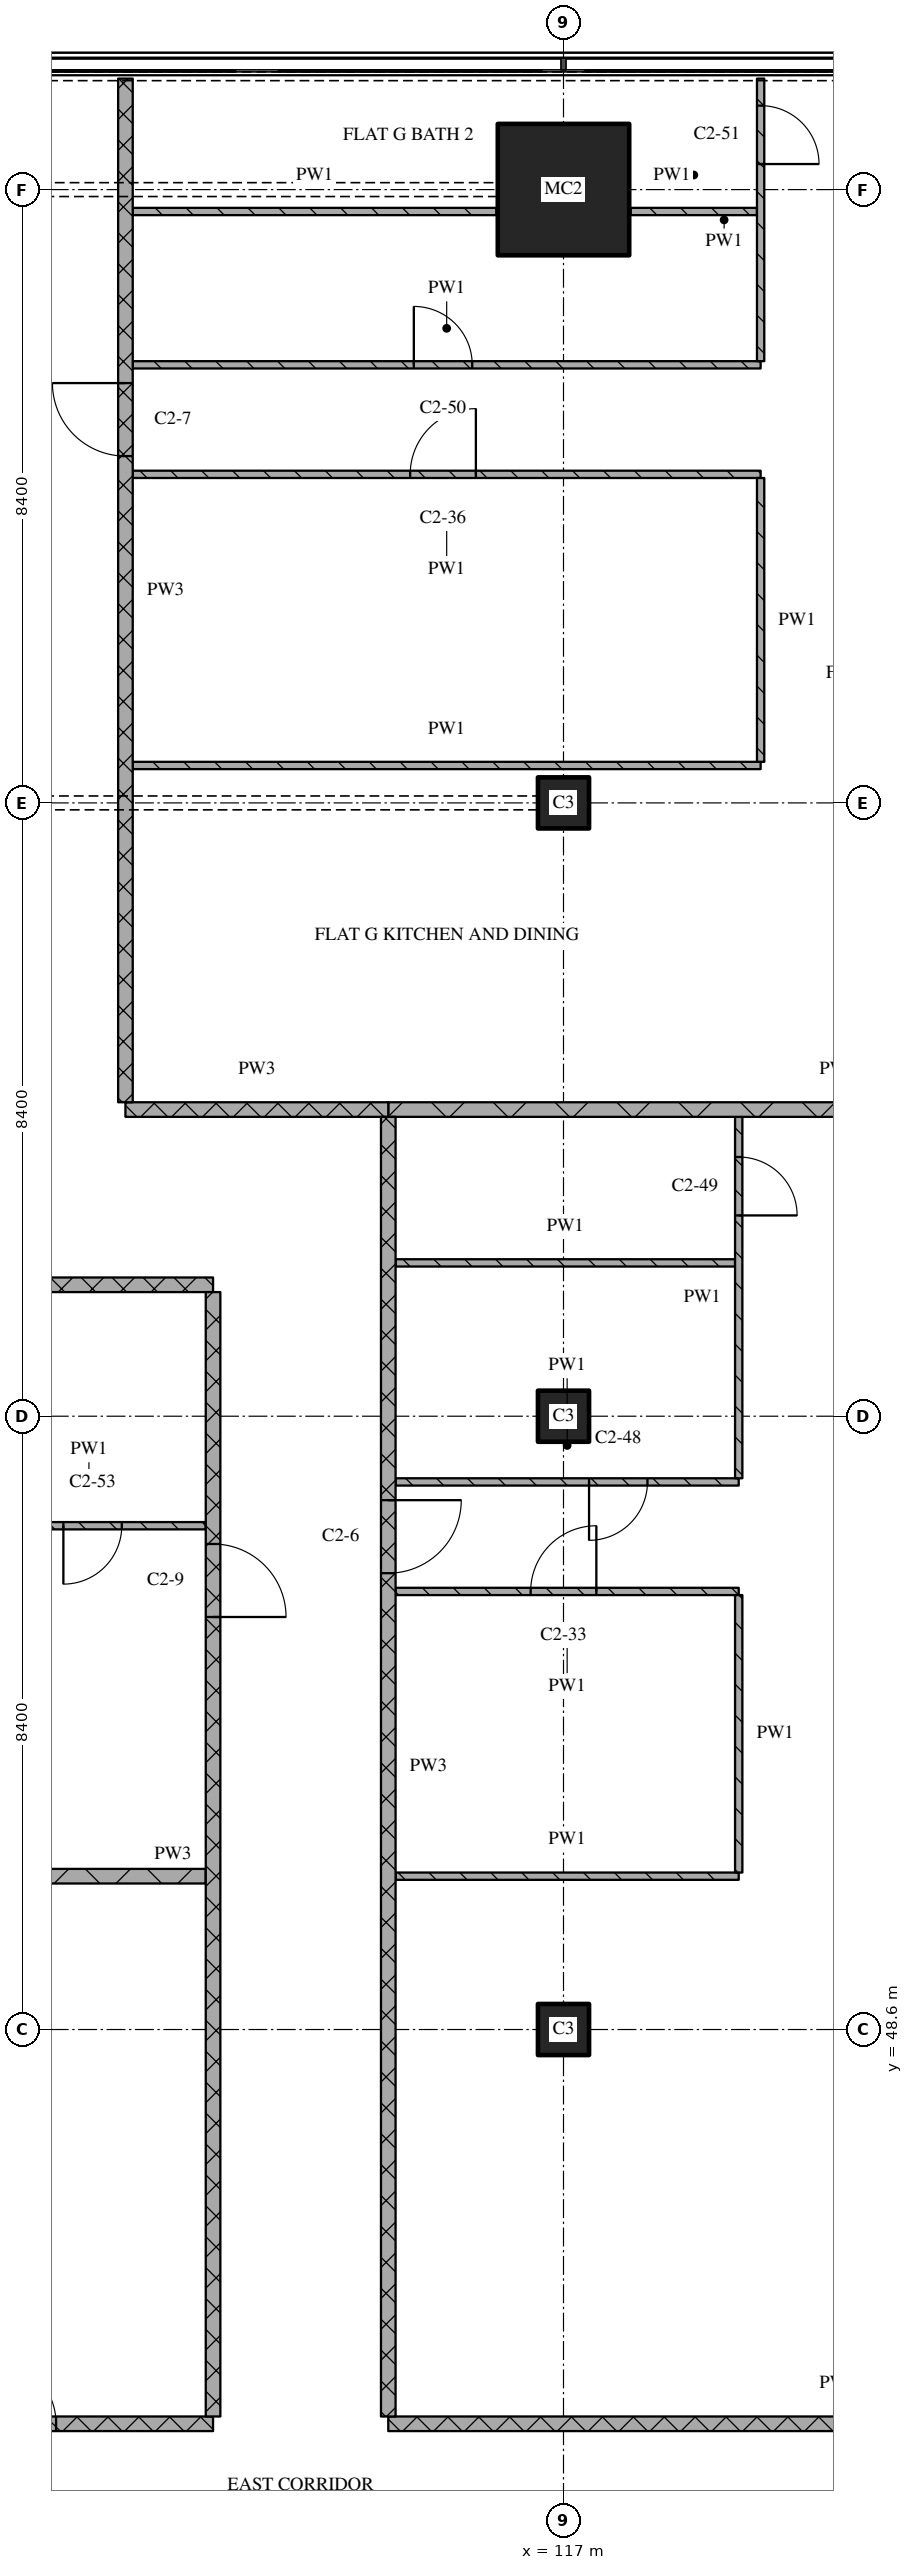
"""IFC4 building model, lengths in metres.
Left out: names, types, materials, properties, quantities, classifications, styles, units other than length and angle.
Written with IfcOpenShell. Run it as: python <this file> out.ifc"""

import sys

from ifc_helpers import new_model, si_unit, direction, frame, frame_2d, origin, origin_2d, place, context, subcontext, project, spatial, rectangle, extrude, element, fill, save


model = new_model("IFC4")
c1 = context("Model", 3, precision=1e-05, world=origin(), true_north=direction((0.0, 1.0)))
c2 = subcontext(c1, "Body", "Model", "MODEL_VIEW")
j1 = project(units=[si_unit("LENGTHUNIT", "METRE"), si_unit("PLANEANGLEUNIT", "RADIAN")], contexts=[c1])
p1 = place(None, origin())
s1 = spatial("IfcSite", under=j1, at=p1, CompositionType="ELEMENT")
p2 = place(p1, origin())
s2 = spatial("IfcBuilding", under=s1, at=p2, CompositionType="ELEMENT")
p3 = place(p2, frame((0.0, 0.0, 161.85)))
s3 = spatial("IfcBuildingStorey", under=s2, at=p3, CompositionType="ELEMENT", Elevation=161.85)
for number, where, z_axis, x_axis in (
    (1, (117.0, 48.6, 0.0), (0.0, 0.0, 1.0), (1.0, 0.0, 0.0)),
    (2, (117.0, 57.0, 0.0), (0.0, 0.0, 1.0), (1.0, 0.0, 0.0)),
    (3, (117.0, 65.4, 0.0), (0.0, 0.0, 1.0), (1.0, 0.0, 0.0)),
):
    element("IfcColumn", number, at=place(p3, frame(where, z_axis=z_axis, x_axis=x_axis)), inside=s3, PredefinedType="COLUMN", context=c2, shape_type="SweptSolid", body=[
        extrude(rectangle(XDim=0.7, YDim=0.7, at=origin_2d()), origin(), (0.0, 0.0, 1.0), 3.6),
    ])
p4 = place(p3, frame((117.0, 73.8, 0.0), z_axis=(0.0, 0.0, 1.0), x_axis=(1.0, 0.0, 0.0)))
e4 = element("IfcColumn", 4, at=p4, inside=s3, PredefinedType="COLUMN", context=c2, shape_type="SweptSolid", body=[
    extrude(rectangle(XDim=1.8, YDim=1.8, at=origin_2d()), origin(), (0.0, 0.0, 1.0), 3.6),
])
p5 = place(p3, frame((107.0, 43.2, 0.0), z_axis=(0.0, 0.0, 1.0), x_axis=(1.0, 0.0, 0.0)))
e5 = element("IfcWall", 5, at=p5, inside=s3, PredefinedType="PARTITIONING", context=c2, shape_type="SweptSolid", body=[
    extrude(rectangle(XDim=5.2, YDim=0.2, at=frame_2d((2.6, 0.0))), origin(), (0.0, 0.0, 1.0), 3.32),
])
p6 = place(p5, frame((2.15, 0.0, 0.0)))
e6 = element("IfcOpeningElement", 6, at=p6, cuts=e5, PredefinedType="OPENING", context=c2, shape_type="SweptSolid", body=[
    extrude(rectangle(XDim=0.9, YDim=2.1, at=frame_2d((0.45, 1.05))), frame((0.0, 0.11, 0.0), z_axis=(0.0, -1.0, 0.0), x_axis=(1.0, 0.0, 0.0)), (0.0, 0.0, 1.0), 0.22),
])
p7 = place(p3, frame((114.6, 43.2, 0.0), z_axis=(0.0, 0.0, 1.0), x_axis=(1.0, 0.0, 0.0)))
e7 = element("IfcWall", 7, at=p7, inside=s3, PredefinedType="PARTITIONING", context=c2, shape_type="SweptSolid", body=[
    extrude(rectangle(XDim=12.32, YDim=0.2, at=frame_2d((6.16, 0.0))), origin(), (0.0, 0.0, 1.0), 3.32),
])
p8 = place(p3, frame((107.0, 50.7, 0.0), z_axis=(0.0, 0.0, 1.0), x_axis=(1.0, 0.0, 0.0)))
e8 = element("IfcWall", 8, at=p8, inside=s3, PredefinedType="PARTITIONING", context=c2, shape_type="SweptSolid", body=[
    extrude(rectangle(XDim=5.1, YDim=0.2, at=frame_2d((2.55, 0.0))), origin(), (0.0, 0.0, 1.0), 3.32),
])
p9 = place(p3, frame((114.7, 50.7, 0.0), z_axis=(0.0, 0.0, 1.0), x_axis=(1.0, 0.0, 0.0)))
e9 = element("IfcWall", 9, at=p9, inside=s3, PredefinedType="PARTITIONING", context=c2, shape_type="SweptSolid", body=[
    extrude(rectangle(XDim=4.7, YDim=0.1, at=frame_2d((2.35, 0.0))), origin(), (0.0, 0.0, 1.0), 3.32),
])
p10 = place(p3, frame((119.4, 54.6, 0.0), z_axis=(0.0, 0.0, 1.0), x_axis=(-1.0, 0.0, 0.0)))
e10 = element("IfcWall", 10, at=p10, inside=s3, PredefinedType="PARTITIONING", context=c2, shape_type="SweptSolid", body=[
    extrude(rectangle(XDim=4.7, YDim=0.1, at=frame_2d((2.35, 0.0))), origin(), (0.0, 0.0, 1.0), 3.32),
])
p11 = place(p10, frame((1.95, 0.0, 0.0)))
e11 = element("IfcOpeningElement", 11, at=p11, cuts=e10, PredefinedType="OPENING", context=c2, shape_type="SweptSolid", body=[
    extrude(rectangle(XDim=0.9, YDim=2.1, at=frame_2d((0.45, 1.05))), frame((0.0, 0.06, 0.0), z_axis=(0.0, -1.0, 0.0), x_axis=(1.0, 0.0, 0.0)), (0.0, 0.0, 1.0), 0.12),
])
p12 = place(p3, frame((108.9, 55.5, 0.0), z_axis=(0.0, 0.0, 1.0), x_axis=(1.0, 0.0, 0.0)))
e12 = element("IfcWall", 12, at=p12, inside=s3, PredefinedType="PARTITIONING", context=c2, shape_type="SweptSolid", body=[
    extrude(rectangle(XDim=3.2, YDim=0.1, at=frame_2d((1.6, 0.0))), origin(), (0.0, 0.0, 1.0), 3.32),
])
p13 = place(p12, frame((1.25, 0.0, 0.0)))
e13 = element("IfcOpeningElement", 13, at=p13, cuts=e12, PredefinedType="OPENING", context=c2, shape_type="SweptSolid", body=[
    extrude(rectangle(XDim=0.8, YDim=2.1, at=frame_2d((0.4, 1.05))), frame((0.0, 0.06, 0.0), z_axis=(0.0, -1.0, 0.0), x_axis=(1.0, 0.0, 0.0)), (0.0, 0.0, 1.0), 0.12),
])
p14 = place(p3, frame((114.7, 56.1, 0.0), z_axis=(0.0, 0.0, 1.0), x_axis=(1.0, 0.0, 0.0)))
e14 = element("IfcWall", 14, at=p14, inside=s3, PredefinedType="PARTITIONING", context=c2, shape_type="SweptSolid", body=[
    extrude(rectangle(XDim=4.7, YDim=0.1, at=frame_2d((2.35, 0.0))), origin(), (0.0, 0.0, 1.0), 3.32),
])
p15 = place(p14, frame((2.65, 0.0, 0.0)))
e15 = element("IfcOpeningElement", 15, at=p15, cuts=e14, PredefinedType="OPENING", context=c2, shape_type="SweptSolid", body=[
    extrude(rectangle(XDim=0.8, YDim=2.1, at=frame_2d((0.4, 1.05))), frame((0.0, 0.06, 0.0), z_axis=(0.0, -1.0, 0.0), x_axis=(1.0, 0.0, 0.0)), (0.0, 0.0, 1.0), 0.12),
])
p16 = place(p3, frame((101.4, 58.8, 0.0), z_axis=(0.0, 0.0, 1.0), x_axis=(1.0, 0.0, 0.0)))
e16 = element("IfcWall", 16, at=p16, inside=s3, PredefinedType="PARTITIONING", context=c2, shape_type="SweptSolid", body=[
    extrude(rectangle(XDim=10.8, YDim=0.2, at=frame_2d((5.4, 0.0))), origin(), (0.0, 0.0, 1.0), 3.32),
])
p17 = place(p3, frame((114.7, 59.1, 0.0), z_axis=(0.0, 0.0, 1.0), x_axis=(1.0, 0.0, 0.0)))
e17 = element("IfcWall", 17, at=p17, inside=s3, PredefinedType="PARTITIONING", context=c2, shape_type="SweptSolid", body=[
    extrude(rectangle(XDim=4.65, YDim=0.1, at=frame_2d((2.325, 0.0))), origin(), (0.0, 0.0, 1.0), 3.32),
])
p18 = place(p3, frame((111.0, 61.2, 0.0), z_axis=(0.0, 0.0, 1.0), x_axis=(1.0, 0.0, 0.0)))
e18 = element("IfcWall", 18, at=p18, inside=s3, PredefinedType="PARTITIONING", context=c2, shape_type="SweptSolid", body=[
    extrude(rectangle(XDim=3.6, YDim=0.2, at=frame_2d((1.8, 0.0))), origin(), (0.0, 0.0, 1.0), 3.32),
])
p19 = place(p3, frame((114.6, 61.2, 0.0), z_axis=(0.0, 0.0, 1.0), x_axis=(1.0, 0.0, 0.0)))
e19 = element("IfcWall", 19, at=p19, inside=s3, PredefinedType="PARTITIONING", context=c2, shape_type="SweptSolid", body=[
    extrude(rectangle(XDim=12.32, YDim=0.2, at=frame_2d((6.16, 0.0))), origin(), (0.0, 0.0, 1.0), 3.32),
])
p20 = place(p3, frame((111.1, 65.913, 0.0), z_axis=(0.0, 0.0, 1.0), x_axis=(1.0, 0.0, 0.0)))
e20 = element("IfcWall", 20, at=p20, inside=s3, PredefinedType="PARTITIONING", context=c2, shape_type="SweptSolid", body=[
    extrude(rectangle(XDim=8.6, YDim=0.1, at=frame_2d((4.3, 0.0))), origin(), (0.0, 0.0, 1.0), 3.32),
])
p21 = place(p3, frame((119.7, 69.9, 0.0), z_axis=(0.0, 0.0, 1.0), x_axis=(-1.0, 0.0, 0.0)))
e21 = element("IfcWall", 21, at=p21, inside=s3, PredefinedType="PARTITIONING", context=c2, shape_type="SweptSolid", body=[
    extrude(rectangle(XDim=8.6, YDim=0.1, at=frame_2d((4.3, 0.0))), origin(), (0.0, 0.0, 1.0), 3.32),
])
p22 = place(p21, frame((3.9, 0.0, 0.0)))
e22 = element("IfcOpeningElement", 22, at=p22, cuts=e21, PredefinedType="OPENING", context=c2, shape_type="SweptSolid", body=[
    extrude(rectangle(XDim=0.9, YDim=2.1, at=frame_2d((0.45, 1.05))), frame((0.0, 0.06, 0.0), z_axis=(0.0, -1.0, 0.0), x_axis=(1.0, 0.0, 0.0)), (0.0, 0.0, 1.0), 0.12),
])
p23 = place(p3, frame((111.1, 71.4, 0.0), z_axis=(0.0, 0.0, 1.0), x_axis=(1.0, 0.0, 0.0)))
e23 = element("IfcWall", 23, at=p23, inside=s3, PredefinedType="PARTITIONING", context=c2, shape_type="SweptSolid", body=[
    extrude(rectangle(XDim=8.6, YDim=0.1, at=frame_2d((4.3, 0.0))), origin(), (0.0, 0.0, 1.0), 3.32),
])
p24 = place(p23, frame((3.85, 0.0, 0.0)))
e24 = element("IfcOpeningElement", 24, at=p24, cuts=e23, PredefinedType="OPENING", context=c2, shape_type="SweptSolid", body=[
    extrude(rectangle(XDim=0.8, YDim=2.1, at=frame_2d((0.4, 1.05))), frame((0.0, 0.06, 0.0), z_axis=(0.0, -1.0, 0.0), x_axis=(1.0, 0.0, 0.0)), (0.0, 0.0, 1.0), 0.12),
])
p25 = place(p3, frame((111.1, 73.5, 0.0), z_axis=(0.0, 0.0, 1.0), x_axis=(1.0, 0.0, 0.0)))
e25 = element("IfcWall", 25, at=p25, inside=s3, PredefinedType="PARTITIONING", context=c2, shape_type="SweptSolid", body=[
    extrude(rectangle(XDim=4.98, YDim=0.1, at=frame_2d((2.49, 0.0))), origin(), (0.0, 0.0, 1.0), 3.32),
])
p26 = place(p3, frame((117.92, 73.5, 0.0), z_axis=(0.0, 0.0, 1.0), x_axis=(1.0, 0.0, 0.0)))
e26 = element("IfcWall", 26, at=p26, inside=s3, PredefinedType="PARTITIONING", context=c2, shape_type="SweptSolid", body=[
    extrude(rectangle(XDim=1.73, YDim=0.1, at=frame_2d((0.865, 0.0))), origin(), (0.0, 0.0, 1.0), 3.32),
])
p27 = place(p3, frame((111.0, 75.32, 0.0), z_axis=(0.0, 0.0, 1.0), x_axis=(0.0, -1.0, 0.0)))
e27 = element("IfcWall", 27, at=p27, inside=s3, PredefinedType="PARTITIONING", context=c2, shape_type="SweptSolid", body=[
    extrude(rectangle(XDim=14.02, YDim=0.2, at=frame_2d((7.01, 0.0))), origin(), (0.0, 0.0, 1.0), 3.32),
])
p28 = place(p27, frame((4.17, 0.0, 0.0)))
e28 = element("IfcOpeningElement", 28, at=p28, cuts=e27, PredefinedType="OPENING", context=c2, shape_type="SweptSolid", body=[
    extrude(rectangle(XDim=1.0, YDim=2.1, at=frame_2d((0.5, 1.05))), frame((0.0, 0.11, 0.0), z_axis=(0.0, -1.0, 0.0), x_axis=(1.0, 0.0, 0.0)), (0.0, 0.0, 1.0), 0.22),
])
p29 = place(p3, frame((112.2, 43.3, 0.0), z_axis=(0.0, 0.0, 1.0), x_axis=(0.0, 1.0, 0.0)))
e29 = element("IfcWall", 29, at=p29, inside=s3, PredefinedType="PARTITIONING", context=c2, shape_type="SweptSolid", body=[
    extrude(rectangle(XDim=15.4, YDim=0.2, at=frame_2d((7.7, 0.0))), origin(), (0.0, 0.0, 1.0), 3.32),
])
p30 = place(p29, frame((10.95, 0.0, 0.0)))
e30 = element("IfcOpeningElement", 30, at=p30, cuts=e29, PredefinedType="OPENING", context=c2, shape_type="SweptSolid", body=[
    extrude(rectangle(XDim=1.0, YDim=2.1, at=frame_2d((0.5, 1.05))), frame((0.0, 0.11, 0.0), z_axis=(0.0, -1.0, 0.0), x_axis=(1.0, 0.0, 0.0)), (0.0, 0.0, 1.0), 0.22),
])
p31 = place(p3, frame((114.6, 61.1, 0.0), z_axis=(0.0, 0.0, 1.0), x_axis=(0.0, -1.0, 0.0)))
e31 = element("IfcWall", 31, at=p31, inside=s3, PredefinedType="PARTITIONING", context=c2, shape_type="SweptSolid", body=[
    extrude(rectangle(XDim=17.8, YDim=0.2, at=frame_2d((8.9, 0.0))), origin(), (0.0, 0.0, 1.0), 3.32),
])
p32 = place(p31, frame((5.25, 0.0, 0.0)))
e32 = element("IfcOpeningElement", 32, at=p32, cuts=e31, PredefinedType="OPENING", context=c2, shape_type="SweptSolid", body=[
    extrude(rectangle(XDim=1.0, YDim=2.1, at=frame_2d((0.5, 1.05))), frame((0.0, 0.11, 0.0), z_axis=(0.0, -1.0, 0.0), x_axis=(1.0, 0.0, 0.0)), (0.0, 0.0, 1.0), 0.22),
])
p33 = place(p3, frame((119.4, 54.55, 0.0), z_axis=(0.0, 0.0, 1.0), x_axis=(0.0, -1.0, 0.0)))
e33 = element("IfcWall", 33, at=p33, inside=s3, PredefinedType="PARTITIONING", context=c2, shape_type="SweptSolid", body=[
    extrude(rectangle(XDim=3.8, YDim=0.1, at=frame_2d((1.9, 0.0))), origin(), (0.0, 0.0, 1.0), 3.32),
])
p34 = place(p3, frame((119.4, 56.15, 0.0), z_axis=(0.0, 0.0, 1.0), x_axis=(0.0, 1.0, 0.0)))
e34 = element("IfcWall", 34, at=p34, inside=s3, PredefinedType="PARTITIONING", context=c2, shape_type="SweptSolid", body=[
    extrude(rectangle(XDim=4.95, YDim=0.1, at=frame_2d((2.475, 0.0))), origin(), (0.0, 0.0, 1.0), 3.32),
])
p35 = place(p34, frame((3.6, 0.0, 0.0)))
e35 = element("IfcOpeningElement", 35, at=p35, cuts=e34, PredefinedType="OPENING", context=c2, shape_type="SweptSolid", body=[
    extrude(rectangle(XDim=0.8, YDim=2.1, at=frame_2d((0.4, 1.05))), frame((0.0, 0.06, 0.0), z_axis=(0.0, -1.0, 0.0), x_axis=(1.0, 0.0, 0.0)), (0.0, 0.0, 1.0), 0.12),
])
p36 = place(p3, frame((119.7, 69.85, 0.0), z_axis=(0.0, 0.0, 1.0), x_axis=(0.0, -1.0, 0.0)))
e36 = element("IfcWall", 36, at=p36, inside=s3, PredefinedType="PARTITIONING", context=c2, shape_type="SweptSolid", body=[
    extrude(rectangle(XDim=3.887, YDim=0.1, at=frame_2d((1.944, 0.0))), origin(), (0.0, 0.0, 1.0), 3.32),
])
p37 = place(p3, frame((119.7, 71.45, 0.0), z_axis=(0.0, 0.0, 1.0), x_axis=(0.0, 1.0, 0.0)))
e37 = element("IfcWall", 37, at=p37, inside=s3, PredefinedType="PARTITIONING", context=c2, shape_type="SweptSolid", body=[
    extrude(rectangle(XDim=3.87, YDim=0.1, at=frame_2d((1.935, 0.0))), origin(), (0.0, 0.0, 1.0), 3.32),
])
p38 = place(p37, frame((2.7, 0.0, 0.0)))
e38 = element("IfcOpeningElement", 38, at=p38, cuts=e37, PredefinedType="OPENING", context=c2, shape_type="SweptSolid", body=[
    extrude(rectangle(XDim=0.8, YDim=2.1, at=frame_2d((0.4, 1.05))), frame((0.0, 0.06, 0.0), z_axis=(0.0, -1.0, 0.0), x_axis=(1.0, 0.0, 0.0)), (0.0, 0.0, 1.0), 0.12),
])
p39 = place(p6, origin())
e39 = element("IfcDoor", 39, at=p39, inside=s3, OperationType="SINGLE_SWING_LEFT", PredefinedType="DOOR", context=c2, shape_type="SweptSolid", body=[
    extrude(rectangle(XDim=0.9, YDim=2.1, at=frame_2d((0.45, 1.05))), frame((0.0, 0.025, 0.0), z_axis=(0.0, -1.0, 0.0), x_axis=(1.0, 0.0, 0.0)), (0.0, 0.0, 1.0), 0.05),
])
fill(e6, e39)
p40 = place(p11, origin())
e40 = element("IfcDoor", 40, at=p40, inside=s3, OperationType="SINGLE_SWING_RIGHT", PredefinedType="DOOR", context=c2, shape_type="SweptSolid", body=[
    extrude(rectangle(XDim=0.9, YDim=2.1, at=frame_2d((0.45, 1.05))), frame((0.0, 0.025, 0.0), z_axis=(0.0, -1.0, 0.0), x_axis=(1.0, 0.0, 0.0)), (0.0, 0.0, 1.0), 0.05),
])
fill(e11, e40)
p41 = place(p13, origin())
e41 = element("IfcDoor", 41, at=p41, inside=s3, OperationType="SINGLE_SWING_RIGHT", PredefinedType="DOOR", context=c2, shape_type="SweptSolid", body=[
    extrude(rectangle(XDim=0.8, YDim=2.1, at=frame_2d((0.4, 1.05))), frame((0.0, 0.025, 0.0), z_axis=(0.0, -1.0, 0.0), x_axis=(1.0, 0.0, 0.0)), (0.0, 0.0, 1.0), 0.05),
])
fill(e13, e41)
p42 = place(p15, origin())
e42 = element("IfcDoor", 42, at=p42, inside=s3, OperationType="SINGLE_SWING_RIGHT", PredefinedType="DOOR", context=c2, shape_type="SweptSolid", body=[
    extrude(rectangle(XDim=0.8, YDim=2.1, at=frame_2d((0.4, 1.05))), frame((0.0, 0.025, 0.0), z_axis=(0.0, -1.0, 0.0), x_axis=(1.0, 0.0, 0.0)), (0.0, 0.0, 1.0), 0.05),
])
fill(e15, e42)
p43 = place(p22, origin())
e43 = element("IfcDoor", 43, at=p43, inside=s3, OperationType="SINGLE_SWING_RIGHT", PredefinedType="DOOR", context=c2, shape_type="SweptSolid", body=[
    extrude(rectangle(XDim=0.9, YDim=2.1, at=frame_2d((0.45, 1.05))), frame((0.0, 0.025, 0.0), z_axis=(0.0, -1.0, 0.0), x_axis=(1.0, 0.0, 0.0)), (0.0, 0.0, 1.0), 0.05),
])
fill(e22, e43)
p44 = place(p24, origin())
e44 = element("IfcDoor", 44, at=p44, inside=s3, OperationType="SINGLE_SWING_LEFT", PredefinedType="DOOR", context=c2, shape_type="SweptSolid", body=[
    extrude(rectangle(XDim=0.8, YDim=2.1, at=frame_2d((0.4, 1.05))), frame((0.0, 0.025, 0.0), z_axis=(0.0, -1.0, 0.0), x_axis=(1.0, 0.0, 0.0)), (0.0, 0.0, 1.0), 0.05),
])
fill(e24, e44)
p45 = place(p28, origin())
e45 = element("IfcDoor", 45, at=p45, inside=s3, OperationType="SINGLE_SWING_RIGHT", PredefinedType="DOOR", context=c2, shape_type="SweptSolid", body=[
    extrude(rectangle(XDim=1.0, YDim=2.1, at=frame_2d((0.5, 1.05))), frame((0.0, 0.025, 0.0), z_axis=(0.0, -1.0, 0.0), x_axis=(1.0, 0.0, 0.0)), (0.0, 0.0, 1.0), 0.05),
])
fill(e28, e45)
p46 = place(p30, origin())
e46 = element("IfcDoor", 46, at=p46, inside=s3, OperationType="SINGLE_SWING_RIGHT", PredefinedType="DOOR", context=c2, shape_type="SweptSolid", body=[
    extrude(rectangle(XDim=1.0, YDim=2.1, at=frame_2d((0.5, 1.05))), frame((0.0, 0.025, 0.0), z_axis=(0.0, -1.0, 0.0), x_axis=(1.0, 0.0, 0.0)), (0.0, 0.0, 1.0), 0.05),
])
fill(e30, e46)
p47 = place(p32, origin())
e47 = element("IfcDoor", 47, at=p47, inside=s3, OperationType="SINGLE_SWING_LEFT", PredefinedType="DOOR", context=c2, shape_type="SweptSolid", body=[
    extrude(rectangle(XDim=1.0, YDim=2.1, at=frame_2d((0.5, 1.05))), frame((0.0, 0.025, 0.0), z_axis=(0.0, -1.0, 0.0), x_axis=(1.0, 0.0, 0.0)), (0.0, 0.0, 1.0), 0.05),
])
fill(e32, e47)
p48 = place(p35, origin())
e48 = element("IfcDoor", 48, at=p48, inside=s3, OperationType="SINGLE_SWING_RIGHT", PredefinedType="DOOR", context=c2, shape_type="SweptSolid", body=[
    extrude(rectangle(XDim=0.8, YDim=2.1, at=frame_2d((0.4, 1.05))), frame((0.0, 0.025, 0.0), z_axis=(0.0, -1.0, 0.0), x_axis=(1.0, 0.0, 0.0)), (0.0, 0.0, 1.0), 0.05),
])
fill(e35, e48)
p49 = place(p38, origin())
e49 = element("IfcDoor", 49, at=p49, inside=s3, OperationType="SINGLE_SWING_RIGHT", PredefinedType="DOOR", context=c2, shape_type="SweptSolid", body=[
    extrude(rectangle(XDim=0.8, YDim=2.1, at=frame_2d((0.4, 1.05))), frame((0.0, 0.025, 0.0), z_axis=(0.0, -1.0, 0.0), x_axis=(1.0, 0.0, 0.0)), (0.0, 0.0, 1.0), 0.05),
])
fill(e38, e49)
save(model, sys.argv[1])
